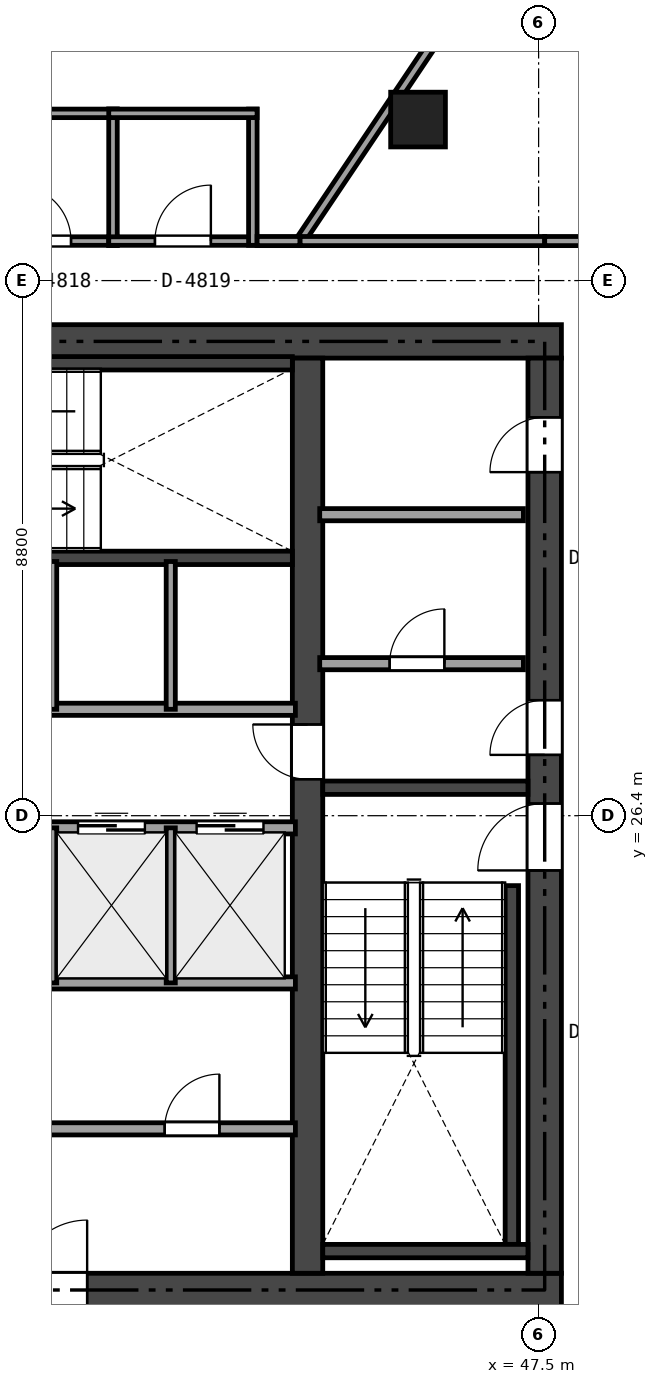
"""IFC4 building model, lengths in metres.
Left out: names, types, materials, properties, quantities, classifications, styles, units other than length and angle.
Written with IfcOpenShell. Run it as: python <this file> out.ifc"""

import sys

from ifc_helpers import new_model, si_unit, direction, frame, frame_2d, origin, origin_2d, place, context, subcontext, project, spatial, rectangle, extrude, element, fill, save


model = new_model("IFC4")
c1 = context("Model", 3, precision=1e-05, world=origin(), true_north=direction((0.0, 1.0)))
c2 = subcontext(c1, "Body", "Model", "MODEL_VIEW")
j1 = project(units=[si_unit("LENGTHUNIT", "METRE"), si_unit("PLANEANGLEUNIT", "RADIAN")], contexts=[c1])
p1 = place(None, origin())
s1 = spatial("IfcSite", under=j1, at=p1, CompositionType="ELEMENT")
p2 = place(p1, origin())
s2 = spatial("IfcBuilding", under=s1, at=p2, CompositionType="ELEMENT")
p3 = place(p2, frame((0.0, 0.0, 180.6)))
s3 = spatial("IfcBuildingStorey", under=s2, at=p3, CompositionType="ELEMENT", Elevation=180.6)
p4 = place(p3, frame((26.525, 18.6, 0.0), z_axis=(0.0, 0.0, 1.0), x_axis=(1.0, 0.0, 0.0)))
e1 = element("IfcWall", 1, at=p4, inside=s3, PredefinedType="SHEAR", context=c2, shape_type="SweptSolid", body=[
    extrude(rectangle(XDim=21.35, YDim=0.55, at=frame_2d((10.675, 0.0))), origin(), (0.0, 0.0, 1.0), 3.32),
])
p5 = place(p4, frame((12.4, 0.0, 0.0)))
e2 = element("IfcOpeningElement", 2, at=p5, cuts=e1, PredefinedType="OPENING", context=c2, shape_type="SweptSolid", body=[
    extrude(rectangle(XDim=1.15, YDim=2.15, at=frame_2d((0.575, 1.075))), frame((0.0, 0.285, 0.0), z_axis=(0.0, -1.0, 0.0), x_axis=(1.0, 0.0, 0.0)), (0.0, 0.0, 1.0), 0.57),
])
p6 = place(p4, frame((5.225, 0.0, 0.0)))
e3 = element("IfcOpeningElement", 3, at=p6, cuts=e1, PredefinedType="OPENING", context=c2, shape_type="SweptSolid", body=[
    extrude(rectangle(XDim=0.9, YDim=2.1, at=frame_2d((0.45, 1.05))), frame((0.0, 0.285, 0.0), z_axis=(0.0, -1.0, 0.0), x_axis=(1.0, 0.0, 0.0)), (0.0, 0.0, 1.0), 0.57),
])
p7 = place(p3, frame((26.525, 34.2, 0.0), z_axis=(0.0, 0.0, 1.0), x_axis=(1.0, 0.0, 0.0)))
e4 = element("IfcWall", 4, at=p7, inside=s3, PredefinedType="SHEAR", context=c2, shape_type="SweptSolid", body=[
    extrude(rectangle(XDim=21.35, YDim=0.55, at=frame_2d((10.675, 0.0))), origin(), (0.0, 0.0, 1.0), 3.32),
])
p8 = place(p7, frame((9.675, 0.0, 0.0)))
e5 = element("IfcOpeningElement", 5, at=p8, cuts=e4, PredefinedType="OPENING", context=c2, shape_type="SweptSolid", body=[
    extrude(rectangle(XDim=1.1, YDim=2.15, at=frame_2d((0.55, 1.075))), frame((0.0, 0.285, 0.0), z_axis=(0.0, -1.0, 0.0), x_axis=(1.0, 0.0, 0.0)), (0.0, 0.0, 1.0), 0.57),
])
p9 = place(p7, frame((1.925, 0.0, 0.0)))
e6 = element("IfcOpeningElement", 6, at=p9, cuts=e4, PredefinedType="OPENING", context=c2, shape_type="SweptSolid", body=[
    extrude(rectangle(XDim=0.9, YDim=2.1, at=frame_2d((0.45, 1.05))), frame((0.0, 0.285, 0.0), z_axis=(0.0, -1.0, 0.0), x_axis=(1.0, 0.0, 0.0)), (0.0, 0.0, 1.0), 0.57),
])
p10 = place(p7, frame((6.225, 0.0, 0.0)))
e7 = element("IfcOpeningElement", 7, at=p10, cuts=e4, PredefinedType="OPENING", context=c2, shape_type="SweptSolid", body=[
    extrude(rectangle(XDim=0.9, YDim=2.1, at=frame_2d((0.45, 1.05))), frame((0.0, 0.285, 0.0), z_axis=(0.0, -1.0, 0.0), x_axis=(1.0, 0.0, 0.0)), (0.0, 0.0, 1.0), 0.57),
])
p11 = place(p3, frame((47.6, 18.875, 0.0), z_axis=(0.0, 0.0, 1.0), x_axis=(0.0, 1.0, 0.0)))
e8 = element("IfcWall", 8, at=p11, inside=s3, PredefinedType="SHEAR", context=c2, shape_type="SweptSolid", body=[
    extrude(rectangle(XDim=15.05, YDim=0.55, at=frame_2d((7.525, 0.0))), origin(), (0.0, 0.0, 1.0), 3.32),
])
p12 = place(p11, frame((6.625, 0.0, 0.0)))
e9 = element("IfcOpeningElement", 9, at=p12, cuts=e8, PredefinedType="OPENING", context=c2, shape_type="SweptSolid", body=[
    extrude(rectangle(XDim=1.1, YDim=2.15, at=frame_2d((0.55, 1.075))), frame((0.0, 0.285, 0.0), z_axis=(0.0, -1.0, 0.0), x_axis=(1.0, 0.0, 0.0)), (0.0, 0.0, 1.0), 0.57),
])
p13 = place(p11, frame((8.525, 0.0, 0.0)))
e10 = element("IfcOpeningElement", 10, at=p13, cuts=e8, PredefinedType="OPENING", context=c2, shape_type="SweptSolid", body=[
    extrude(rectangle(XDim=0.9, YDim=2.1, at=frame_2d((0.45, 1.05))), frame((0.0, 0.285, 0.0), z_axis=(0.0, -1.0, 0.0), x_axis=(1.0, 0.0, 0.0)), (0.0, 0.0, 1.0), 0.57),
])
p14 = place(p11, frame((13.175, 0.0, 0.0)))
e11 = element("IfcOpeningElement", 11, at=p14, cuts=e8, PredefinedType="OPENING", context=c2, shape_type="SweptSolid", body=[
    extrude(rectangle(XDim=0.9, YDim=2.1, at=frame_2d((0.45, 1.05))), frame((0.0, 0.285, 0.0), z_axis=(0.0, -1.0, 0.0), x_axis=(1.0, 0.0, 0.0)), (0.0, 0.0, 1.0), 0.57),
])
p15 = place(p3, frame((43.7, 18.875, 0.0), z_axis=(0.0, 0.0, 1.0), x_axis=(0.0, 1.0, 0.0)))
e12 = element("IfcWall", 12, at=p15, inside=s3, PredefinedType="SHEAR", context=c2, shape_type="SweptSolid", body=[
    extrude(rectangle(XDim=15.05, YDim=0.5, at=frame_2d((7.525, 0.0))), origin(), (0.0, 0.0, 1.0), 3.32),
])
p16 = place(p15, frame((8.125, 0.0, 0.0)))
e13 = element("IfcOpeningElement", 13, at=p16, cuts=e12, PredefinedType="OPENING", context=c2, shape_type="SweptSolid", body=[
    extrude(rectangle(XDim=0.9, YDim=2.1, at=frame_2d((0.45, 1.05))), frame((0.0, 0.26, 0.0), z_axis=(0.0, -1.0, 0.0), x_axis=(1.0, 0.0, 0.0)), (0.0, 0.0, 1.0), 0.52),
])
p17 = place(p3, frame((43.95, 26.86, 0.0), z_axis=(0.0, 0.0, 1.0), x_axis=(1.0, 0.0, 0.0)))
e14 = element("IfcWall", 14, at=p17, inside=s3, PredefinedType="SHEAR", context=c2, shape_type="SweptSolid", body=[
    extrude(rectangle(XDim=3.375, YDim=0.22, at=frame_2d((1.688, 0.0))), origin(), (0.0, 0.0, 1.0), 3.32),
])
p18 = place(p3, frame((47.06, 19.35, 0.0), z_axis=(0.0, 0.0, 1.0), x_axis=(0.0, 1.0, 0.0)))
e15 = element("IfcWall", 15, at=p18, inside=s3, PredefinedType="SHEAR", context=c2, shape_type="SweptSolid", body=[
    extrude(rectangle(XDim=5.9, YDim=0.22, at=frame_2d((2.95, 0.0))), origin(), (0.0, 0.0, 1.0), 3.32),
])
p19 = place(p3, frame((43.95, 19.24, 0.0), z_axis=(0.0, 0.0, 1.0), x_axis=(1.0, 0.0, 0.0)))
e16 = element("IfcWall", 16, at=p19, inside=s3, PredefinedType="SHEAR", context=c2, shape_type="SweptSolid", body=[
    extrude(rectangle(XDim=3.375, YDim=0.22, at=frame_2d((1.688, 0.0))), origin(), (0.0, 0.0, 1.0), 3.32),
])
p20 = place(p3, frame((35.84, 30.64, 0.0), z_axis=(0.0, 0.0, 1.0), x_axis=(1.0, 0.0, 0.0)))
e17 = element("IfcWall", 17, at=p20, inside=s3, PredefinedType="SHEAR", context=c2, shape_type="SweptSolid", body=[
    extrude(rectangle(XDim=7.61, YDim=0.22, at=frame_2d((3.805, 0.0))), origin(), (0.0, 0.0, 1.0), 3.32),
])
p21 = place(p3, frame((37.55, 33.84, 0.0), z_axis=(0.0, 0.0, 1.0), x_axis=(1.0, 0.0, 0.0)))
e18 = element("IfcWall", 18, at=p21, inside=s3, PredefinedType="SHEAR", context=c2, shape_type="SweptSolid", body=[
    extrude(rectangle(XDim=5.9, YDim=0.22, at=frame_2d((2.95, 0.0))), origin(), (0.0, 0.0, 1.0), 3.32),
])
p22 = place(p3, frame((45.517, 37.848, 0.0), z_axis=(0.0, 0.0, 1.0), x_axis=(1.0, 0.0, 0.0)))
e19 = element("IfcColumn", 19, at=p22, inside=s3, PredefinedType="COLUMN", context=c2, shape_type="SweptSolid", body=[
    extrude(rectangle(XDim=0.9, YDim=0.9, at=origin_2d()), origin(), (0.0, 0.0, 1.0), 3.32),
])
p23 = place(p3, frame((43.9, 28.9, 0.0), z_axis=(0.0, 0.0, 1.0), x_axis=(1.0, 0.0, 0.0)))
e20 = element("IfcWall", 20, at=p23, inside=s3, PredefinedType="SOLIDWALL", context=c2, shape_type="SweptSolid", body=[
    extrude(rectangle(XDim=3.35, YDim=0.2, at=frame_2d((1.675, 0.0))), origin(), (0.0, 0.0, 1.0), 3.32),
])
p24 = place(p23, frame((1.15, 0.0, 0.0)))
e21 = element("IfcOpeningElement", 21, at=p24, cuts=e20, PredefinedType="OPENING", context=c2, shape_type="SweptSolid", body=[
    extrude(rectangle(XDim=0.9, YDim=2.1, at=frame_2d((0.45, 1.05))), frame((0.0, 0.11, 0.0), z_axis=(0.0, -1.0, 0.0), x_axis=(1.0, 0.0, 0.0)), (0.0, 0.0, 1.0), 0.22),
])
p25 = place(p3, frame((43.9, 31.35, 0.0), z_axis=(0.0, 0.0, 1.0), x_axis=(1.0, 0.0, 0.0)))
e22 = element("IfcWall", 22, at=p25, inside=s3, PredefinedType="SOLIDWALL", context=c2, shape_type="SweptSolid", body=[
    extrude(rectangle(XDim=3.35, YDim=0.2, at=frame_2d((1.675, 0.0))), origin(), (0.0, 0.0, 1.0), 2.949),
])
p26 = place(p3, frame((35.62, 28.15, 0.0), z_axis=(0.0, 0.0, 1.0), x_axis=(1.0, 0.0, 0.0)))
e23 = element("IfcWall", 23, at=p26, inside=s3, PredefinedType="SOLIDWALL", context=c2, shape_type="SweptSolid", body=[
    extrude(rectangle(XDim=7.88, YDim=0.2, at=frame_2d((3.94, 0.0))), origin(), (0.0, 0.0, 1.0), 3.32),
])
p27 = place(p3, frame((35.62, 26.2, 0.0), z_axis=(0.0, 0.0, 1.0), x_axis=(1.0, 0.0, 0.0)))
e24 = element("IfcWall", 24, at=p27, inside=s3, PredefinedType="SOLIDWALL", context=c2, shape_type="SweptSolid", body=[
    extrude(rectangle(XDim=7.88, YDim=0.2, at=frame_2d((3.94, 0.0))), origin(), (0.0, 0.0, 1.0), 3.32),
])
p28 = place(p27, frame((0.405, 0.0, 0.0)))
e25 = element("IfcOpeningElement", 25, at=p28, cuts=e24, PredefinedType="OPENING", context=c2, shape_type="SweptSolid", body=[
    extrude(rectangle(XDim=1.1, YDim=2.15, at=frame_2d((0.55, 1.075))), frame((0.0, 0.11, 0.0), z_axis=(0.0, -1.0, 0.0), x_axis=(1.0, 0.0, 0.0)), (0.0, 0.0, 1.0), 0.22),
])
p29 = place(p27, frame((2.355, 0.0, 0.0)))
e26 = element("IfcOpeningElement", 26, at=p29, cuts=e24, PredefinedType="OPENING", context=c2, shape_type="SweptSolid", body=[
    extrude(rectangle(XDim=1.1, YDim=2.15, at=frame_2d((0.55, 1.075))), frame((0.0, 0.11, 0.0), z_axis=(0.0, -1.0, 0.0), x_axis=(1.0, 0.0, 0.0)), (0.0, 0.0, 1.0), 0.22),
])
p30 = place(p27, frame((4.305, 0.0, 0.0)))
e27 = element("IfcOpeningElement", 27, at=p30, cuts=e24, PredefinedType="OPENING", context=c2, shape_type="SweptSolid", body=[
    extrude(rectangle(XDim=1.1, YDim=2.15, at=frame_2d((0.55, 1.075))), frame((0.0, 0.11, 0.0), z_axis=(0.0, -1.0, 0.0), x_axis=(1.0, 0.0, 0.0)), (0.0, 0.0, 1.0), 0.22),
])
p31 = place(p27, frame((6.255, 0.0, 0.0)))
e28 = element("IfcOpeningElement", 28, at=p31, cuts=e24, PredefinedType="OPENING", context=c2, shape_type="SweptSolid", body=[
    extrude(rectangle(XDim=1.1, YDim=2.15, at=frame_2d((0.55, 1.075))), frame((0.0, 0.11, 0.0), z_axis=(0.0, -1.0, 0.0), x_axis=(1.0, 0.0, 0.0)), (0.0, 0.0, 1.0), 0.22),
])
p32 = place(p3, frame((35.62, 23.65, 0.0), z_axis=(0.0, 0.0, 1.0), x_axis=(1.0, 0.0, 0.0)))
e29 = element("IfcWall", 29, at=p32, inside=s3, PredefinedType="SOLIDWALL", context=c2, shape_type="SweptSolid", body=[
    extrude(rectangle(XDim=7.88, YDim=0.2, at=frame_2d((3.94, 0.0))), origin(), (0.0, 0.0, 1.0), 2.841),
])
p33 = place(p3, frame((35.62, 21.25, 0.0), z_axis=(0.0, 0.0, 1.0), x_axis=(1.0, 0.0, 0.0)))
e30 = element("IfcWall", 30, at=p33, inside=s3, PredefinedType="SOLIDWALL", context=c2, shape_type="SweptSolid", body=[
    extrude(rectangle(XDim=7.88, YDim=0.2, at=frame_2d((3.94, 0.0))), origin(), (0.0, 0.0, 1.0), 3.32),
])
p34 = place(p33, frame((1.13, 0.0, 0.0)))
e31 = element("IfcOpeningElement", 31, at=p34, cuts=e30, PredefinedType="OPENING", context=c2, shape_type="SweptSolid", body=[
    extrude(rectangle(XDim=0.9, YDim=2.1, at=frame_2d((0.45, 1.05))), frame((0.0, 0.11, 0.0), z_axis=(0.0, -1.0, 0.0), x_axis=(1.0, 0.0, 0.0)), (0.0, 0.0, 1.0), 0.22),
])
p35 = place(p33, frame((5.73, 0.0, 0.0)))
e32 = element("IfcOpeningElement", 32, at=p35, cuts=e30, PredefinedType="OPENING", context=c2, shape_type="SweptSolid", body=[
    extrude(rectangle(XDim=0.9, YDim=2.1, at=frame_2d((0.45, 1.05))), frame((0.0, 0.11, 0.0), z_axis=(0.0, -1.0, 0.0), x_axis=(1.0, 0.0, 0.0)), (0.0, 0.0, 1.0), 0.22),
])
for number, where, z_axis, x_axis in (
    (33, (39.5, 28.15, 0.0), (0.0, 0.0, 1.0), (0.0, 1.0, 0.0)),
    (34, (41.45, 28.15, 0.0), (0.0, 0.0, 1.0), (0.0, 1.0, 0.0)),
):
    element("IfcWall", number, at=place(p3, frame(where, z_axis=z_axis, x_axis=x_axis)), inside=s3, PredefinedType="PARTITIONING", context=c2, shape_type="SweptSolid", body=[
        extrude(rectangle(XDim=2.43, YDim=0.15, at=frame_2d((1.215, 0.0))), origin(), (0.0, 0.0, 1.0), 3.32),
    ])
for number, where, z_axis, x_axis in (
    (35, (39.5, 23.65, 0.0), (0.0, 0.0, 1.0), (0.0, 1.0, 0.0)),
    (36, (41.45, 23.65, 0.0), (0.0, 0.0, 1.0), (0.0, 1.0, 0.0)),
):
    element("IfcWall", number, at=place(p3, frame(where, z_axis=z_axis, x_axis=x_axis)), inside=s3, PredefinedType="PARTITIONING", context=c2, shape_type="SweptSolid", body=[
        extrude(rectangle(XDim=2.55, YDim=0.15, at=frame_2d((1.275, 0.0))), origin(), (0.0, 0.0, 1.0), 2.841),
    ])
p36 = place(p3, frame((38.13, 35.85, 0.0), z_axis=(0.0, 0.0, 1.0), x_axis=(1.0, 0.0, 0.0)))
e37 = element("IfcWall", 37, at=p36, inside=s3, PredefinedType="PARTITIONING", context=c2, shape_type="SweptSolid", body=[
    extrude(rectangle(XDim=2.44, YDim=0.14, at=frame_2d((1.22, 0.0))), origin(), (0.0, 0.0, 1.0), 2.841),
])
p37 = place(p36, frame((0.76, 0.0, 0.0)))
e38 = element("IfcOpeningElement", 38, at=p37, cuts=e37, PredefinedType="OPENING", context=c2, shape_type="SweptSolid", body=[
    extrude(rectangle(XDim=0.92, YDim=2.1, at=frame_2d((0.46, 1.05))), frame((0.0, 0.08, 0.0), z_axis=(0.0, -1.0, 0.0), x_axis=(1.0, 0.0, 0.0)), (0.0, 0.0, 1.0), 0.16),
])
p38 = place(p3, frame((40.5, 35.78, 0.0), z_axis=(0.0, 0.0, 1.0), x_axis=(0.0, 1.0, 0.0)))
e39 = element("IfcWall", 39, at=p38, inside=s3, PredefinedType="PARTITIONING", context=c2, shape_type="SweptSolid", body=[
    extrude(rectangle(XDim=2.24, YDim=0.14, at=frame_2d((1.12, 0.0))), origin(), (0.0, 0.0, 1.0), 2.949),
])
p39 = place(p3, frame((40.57, 37.95, 0.0), z_axis=(0.0, 0.0, 1.0), x_axis=(-1.0, 0.0, 0.0)))
e40 = element("IfcWall", 40, at=p39, inside=s3, PredefinedType="PARTITIONING", context=c2, shape_type="SweptSolid", body=[
    extrude(rectangle(XDim=2.44, YDim=0.14, at=frame_2d((1.22, 0.0))), origin(), (0.0, 0.0, 1.0), 2.841),
])
p40 = place(p3, frame((40.43, 35.85, 0.0), z_axis=(0.0, 0.0, 1.0), x_axis=(1.0, 0.0, 0.0)))
e41 = element("IfcWall", 41, at=p40, inside=s3, PredefinedType="PARTITIONING", context=c2, shape_type="SweptSolid", body=[
    extrude(rectangle(XDim=2.44, YDim=0.14, at=frame_2d((1.22, 0.0))), origin(), (0.0, 0.0, 1.0), 2.841),
])
p41 = place(p40, frame((0.76, 0.0, 0.0)))
e42 = element("IfcOpeningElement", 42, at=p41, cuts=e41, PredefinedType="OPENING", context=c2, shape_type="SweptSolid", body=[
    extrude(rectangle(XDim=0.92, YDim=2.1, at=frame_2d((0.46, 1.05))), frame((0.0, 0.08, 0.0), z_axis=(0.0, -1.0, 0.0), x_axis=(1.0, 0.0, 0.0)), (0.0, 0.0, 1.0), 0.16),
])
p42 = place(p3, frame((42.8, 35.78, 0.0), z_axis=(0.0, 0.0, 1.0), x_axis=(0.0, 1.0, 0.0)))
e43 = element("IfcWall", 43, at=p42, inside=s3, PredefinedType="PARTITIONING", context=c2, shape_type="SweptSolid", body=[
    extrude(rectangle(XDim=2.24, YDim=0.14, at=frame_2d((1.12, 0.0))), origin(), (0.0, 0.0, 1.0), 2.949),
])
p43 = place(p3, frame((42.87, 37.95, 0.0), z_axis=(0.0, 0.0, 1.0), x_axis=(-1.0, 0.0, 0.0)))
e44 = element("IfcWall", 44, at=p43, inside=s3, PredefinedType="PARTITIONING", context=c2, shape_type="SweptSolid", body=[
    extrude(rectangle(XDim=2.44, YDim=0.14, at=frame_2d((1.22, 0.0))), origin(), (0.0, 0.0, 1.0), 2.841),
])
p44 = place(p3, frame((49.589, 44.806, 0.0), z_axis=(0.0, 0.0, 1.0), x_axis=(-0.55755874388, -0.83013748688, 0.0)))
e45 = element("IfcWall", 45, at=p44, inside=s3, PredefinedType="PARTITIONING", context=c2, shape_type="SweptSolid", body=[
    extrude(rectangle(XDim=10.788, YDim=0.15, at=frame_2d((5.394, 0.0))), origin(), (0.0, 0.0, 1.0), 2.905),
])
p45 = place(p3, frame((43.574, 35.85, 0.0), z_axis=(0.0, 0.0, 1.0), x_axis=(1.0, 0.0, 0.0)))
e46 = element("IfcWall", 46, at=p45, inside=s3, PredefinedType="PARTITIONING", context=c2, shape_type="SweptSolid", body=[
    extrude(rectangle(XDim=4.026, YDim=0.15, at=frame_2d((2.013, 0.0))), origin(), (0.0, 0.0, 1.0), 2.697),
])
p46 = place(p3, frame((47.6, 35.85, 0.0), z_axis=(0.0, 0.0, 1.0), x_axis=(1.0, 0.0, 0.0)))
e47 = element("IfcWall", 47, at=p46, inside=s3, PredefinedType="PARTITIONING", context=c2, shape_type="SweptSolid", body=[
    extrude(rectangle(XDim=1.65, YDim=0.15, at=frame_2d((0.825, 0.0))), origin(), (0.0, 0.0, 1.0), 3.32),
])
p47 = place(p3, frame((42.87, 35.85, 0.0), z_axis=(0.0, 0.0, 1.0), x_axis=(1.0, 0.0, 0.0)))
e48 = element("IfcWall", 48, at=p47, inside=s3, PredefinedType="PARTITIONING", context=c2, shape_type="SweptSolid", body=[
    extrude(rectangle(XDim=0.704, YDim=0.15, at=frame_2d((0.352, 0.0))), origin(), (0.0, 0.0, 1.0), 2.949),
])
p48 = place(p12, origin())
e49 = element("IfcDoor", 49, at=p48, inside=s3, OperationType="SINGLE_SWING_LEFT", PredefinedType="DOOR", context=c2, shape_type="SweptSolid", body=[
    extrude(rectangle(XDim=1.1, YDim=2.15, at=frame_2d((0.55, 1.075))), frame((0.0, 0.025, 0.0), z_axis=(0.0, -1.0, 0.0), x_axis=(1.0, 0.0, 0.0)), (0.0, 0.0, 1.0), 0.05),
])
fill(e9, e49)
p49 = place(p16, origin())
e50 = element("IfcDoor", 50, at=p49, inside=s3, OperationType="SINGLE_SWING_RIGHT", PredefinedType="DOOR", context=c2, shape_type="SweptSolid", body=[
    extrude(rectangle(XDim=0.9, YDim=2.1, at=frame_2d((0.45, 1.05))), frame((0.0, 0.025, 0.0), z_axis=(0.0, -1.0, 0.0), x_axis=(1.0, 0.0, 0.0)), (0.0, 0.0, 1.0), 0.05),
])
fill(e13, e50)
p50 = place(p13, origin())
e51 = element("IfcDoor", 51, at=p50, inside=s3, OperationType="SINGLE_SWING_LEFT", PredefinedType="DOOR", context=c2, shape_type="SweptSolid", body=[
    extrude(rectangle(XDim=0.9, YDim=2.1, at=frame_2d((0.45, 1.05))), frame((0.0, 0.025, 0.0), z_axis=(0.0, -1.0, 0.0), x_axis=(1.0, 0.0, 0.0)), (0.0, 0.0, 1.0), 0.05),
])
fill(e10, e51)
p51 = place(p5, origin())
e52 = element("IfcDoor", 52, at=p51, inside=s3, OperationType="SINGLE_SWING_RIGHT", PredefinedType="DOOR", context=c2, shape_type="SweptSolid", body=[
    extrude(rectangle(XDim=1.15, YDim=2.15, at=frame_2d((0.575, 1.075))), frame((0.0, 0.025, 0.0), z_axis=(0.0, -1.0, 0.0), x_axis=(1.0, 0.0, 0.0)), (0.0, 0.0, 1.0), 0.05),
])
fill(e2, e52)
p52 = place(p24, origin())
e53 = element("IfcDoor", 53, at=p52, inside=s3, OperationType="SINGLE_SWING_RIGHT", PredefinedType="DOOR", context=c2, shape_type="SweptSolid", body=[
    extrude(rectangle(XDim=0.9, YDim=2.1, at=frame_2d((0.45, 1.05))), frame((0.0, 0.025, 0.0), z_axis=(0.0, -1.0, 0.0), x_axis=(1.0, 0.0, 0.0)), (0.0, 0.0, 1.0), 0.05),
])
fill(e21, e53)
p53 = place(p14, origin())
e54 = element("IfcDoor", 54, at=p53, inside=s3, OperationType="SINGLE_SWING_LEFT", PredefinedType="DOOR", context=c2, shape_type="SweptSolid", body=[
    extrude(rectangle(XDim=0.9, YDim=2.1, at=frame_2d((0.45, 1.05))), frame((0.0, 0.025, 0.0), z_axis=(0.0, -1.0, 0.0), x_axis=(1.0, 0.0, 0.0)), (0.0, 0.0, 1.0), 0.05),
])
fill(e11, e54)
p54 = place(p35, origin())
e55 = element("IfcDoor", 55, at=p54, inside=s3, OperationType="SINGLE_SWING_RIGHT", PredefinedType="DOOR", context=c2, shape_type="SweptSolid", body=[
    extrude(rectangle(XDim=0.9, YDim=2.1, at=frame_2d((0.45, 1.05))), frame((0.0, 0.025, 0.0), z_axis=(0.0, -1.0, 0.0), x_axis=(1.0, 0.0, 0.0)), (0.0, 0.0, 1.0), 0.05),
])
fill(e32, e55)
p55 = place(p30, origin())
e56 = element("IfcDoor", 56, at=p55, inside=s3, OperationType="SLIDING_TO_LEFT", PredefinedType="DOOR", context=c2, shape_type="SweptSolid", body=[
    extrude(rectangle(XDim=1.1, YDim=2.15, at=frame_2d((0.55, 1.075))), frame((0.0, 0.025, 0.0), z_axis=(0.0, -1.0, 0.0), x_axis=(1.0, 0.0, 0.0)), (0.0, 0.0, 1.0), 0.05),
])
fill(e27, e56)
p56 = place(p31, origin())
e57 = element("IfcDoor", 57, at=p56, inside=s3, OperationType="SLIDING_TO_LEFT", PredefinedType="DOOR", context=c2, shape_type="SweptSolid", body=[
    extrude(rectangle(XDim=1.1, YDim=2.15, at=frame_2d((0.55, 1.075))), frame((0.0, 0.025, 0.0), z_axis=(0.0, -1.0, 0.0), x_axis=(1.0, 0.0, 0.0)), (0.0, 0.0, 1.0), 0.05),
])
fill(e28, e57)
p57 = place(p37, origin())
e58 = element("IfcDoor", 58, at=p57, inside=s3, OperationType="SINGLE_SWING_LEFT", PredefinedType="DOOR", context=c2, shape_type="SweptSolid", body=[
    extrude(rectangle(XDim=0.92, YDim=2.1, at=frame_2d((0.46, 1.05))), frame((0.0, 0.025, 0.0), z_axis=(0.0, -1.0, 0.0), x_axis=(1.0, 0.0, 0.0)), (0.0, 0.0, 1.0), 0.05),
])
fill(e38, e58)
p58 = place(p41, origin())
e59 = element("IfcDoor", 59, at=p58, inside=s3, OperationType="SINGLE_SWING_RIGHT", PredefinedType="DOOR", context=c2, shape_type="SweptSolid", body=[
    extrude(rectangle(XDim=0.92, YDim=2.1, at=frame_2d((0.46, 1.05))), frame((0.0, 0.025, 0.0), z_axis=(0.0, -1.0, 0.0), x_axis=(1.0, 0.0, 0.0)), (0.0, 0.0, 1.0), 0.05),
])
fill(e42, e59)
save(model, sys.argv[1])
